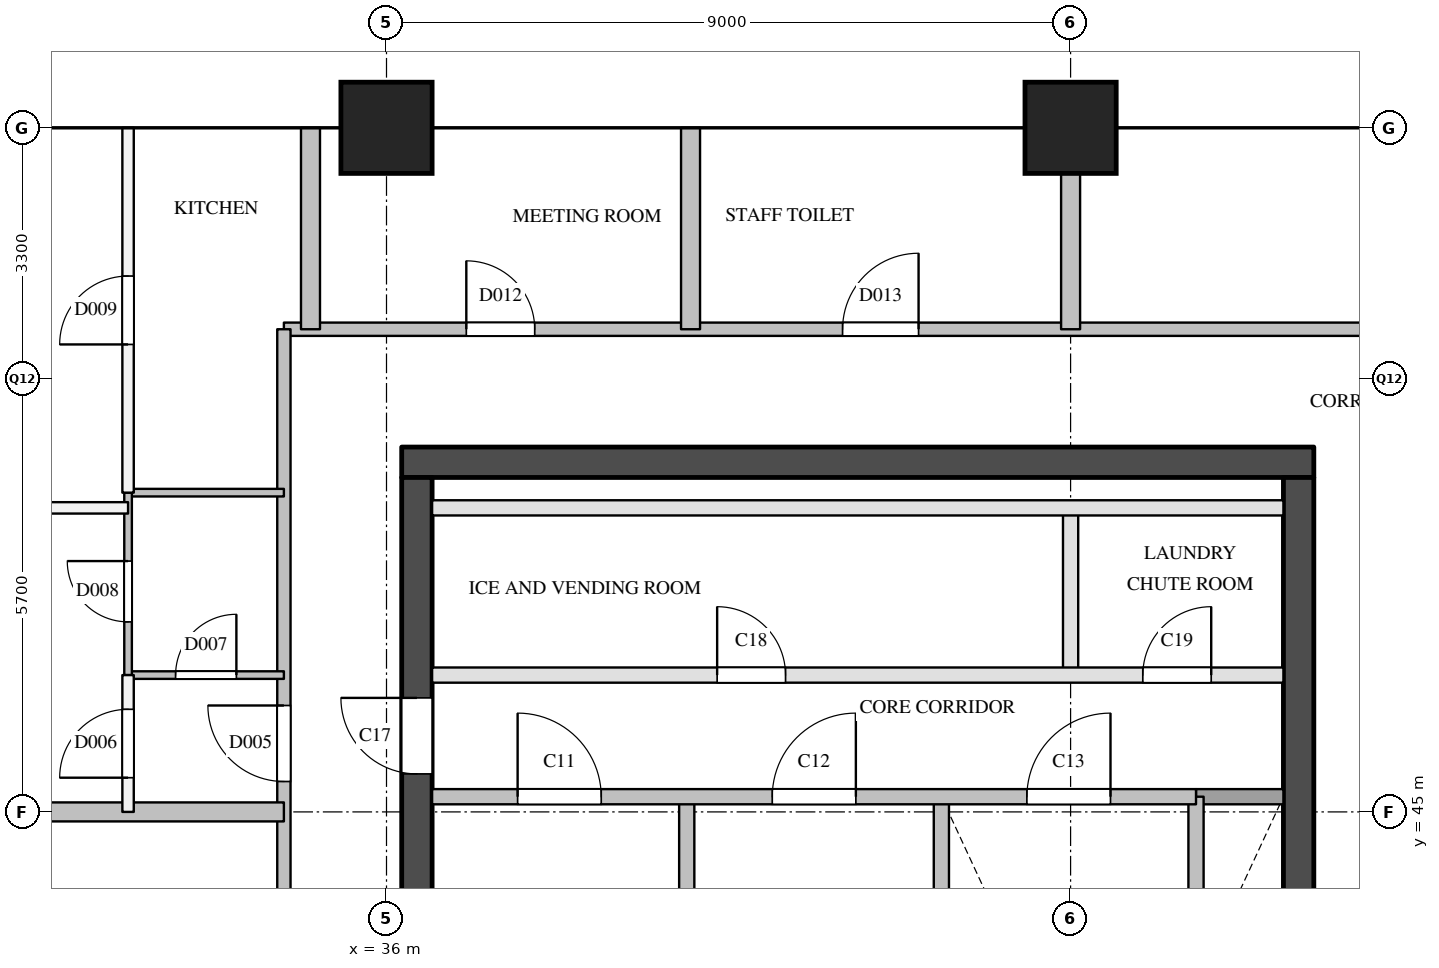
"""IFC4 building model, lengths in metres.
Left out: names, types, materials, properties, quantities, classifications, styles, units other than length and angle.
Written with IfcOpenShell. Run it as: python <this file> out.ifc"""

import sys

from ifc_helpers import new_model, si_unit, direction, frame, frame_2d, origin, origin_2d, place, context, subcontext, project, spatial, rectangle, extrude, element, fill, save


model = new_model("IFC4")
c1 = context("Model", 3, precision=1e-05, world=origin(), true_north=direction((0.0, 1.0)))
c2 = subcontext(c1, "Body", "Model", "MODEL_VIEW")
j1 = project(units=[si_unit("LENGTHUNIT", "METRE"), si_unit("PLANEANGLEUNIT", "RADIAN")], contexts=[c1])
p1 = place(None, origin())
s1 = spatial("IfcSite", under=j1, at=p1, CompositionType="ELEMENT")
p2 = place(p1, origin())
s2 = spatial("IfcBuilding", under=s1, at=p2, CompositionType="ELEMENT")
p3 = place(p2, frame((0.0, 0.0, 261.8)))
s3 = spatial("IfcBuildingStorey", under=s2, at=p3, CompositionType="ELEMENT", Elevation=261.8)
for number, where, z_axis, x_axis in (
    (1, (36.0, 54.0, 0.0), (0.0, 0.0, 1.0), (1.0, 0.0, 0.0)),
    (2, (45.0, 54.0, 0.0), (0.0, 0.0, 1.0), (1.0, 0.0, 0.0)),
):
    element("IfcColumn", number, at=place(p3, frame(where, z_axis=z_axis, x_axis=x_axis)), inside=s3, PredefinedType="COLUMN", context=c2, shape_type="SweptSolid", body=[
        extrude(rectangle(XDim=1.2, YDim=1.2, at=origin_2d()), origin(), (0.0, 0.0, 1.0), 3.9),
    ])
p4 = place(p3, frame((36.2, 49.6, 0.0), z_axis=(0.0, 0.0, 1.0), x_axis=(1.0, 0.0, 0.0)))
e3 = element("IfcWall", 3, at=p4, inside=s3, PredefinedType="SHEAR", context=c2, shape_type="SweptSolid", body=[
    extrude(rectangle(XDim=12.0, YDim=0.4, at=frame_2d((6.0, 0.0))), origin(), (0.0, 0.0, 1.0), 3.6),
])
p5 = place(p3, frame((36.4, 29.1, 0.0), z_axis=(0.0, 0.0, 1.0), x_axis=(0.0, 1.0, 0.0)))
e4 = element("IfcWall", 4, at=p5, inside=s3, PredefinedType="SHEAR", context=c2, shape_type="SweptSolid", body=[
    extrude(rectangle(XDim=20.3, YDim=0.4, at=frame_2d((10.15, 0.0))), origin(), (0.0, 0.0, 1.0), 3.6),
])
p6 = place(p5, frame((3.6, 0.0, 0.0)))
e5 = element("IfcOpeningElement", 5, at=p6, cuts=e4, PredefinedType="OPENING", context=c2, shape_type="SweptSolid", body=[
    extrude(rectangle(XDim=1.8, YDim=2.1, at=frame_2d((0.9, 1.05))), frame((0.0, 0.21, 0.0), z_axis=(0.0, -1.0, 0.0), x_axis=(1.0, 0.0, 0.0)), (0.0, 0.0, 1.0), 0.42),
])
p7 = place(p5, frame((16.4, 0.0, 0.0)))
e6 = element("IfcOpeningElement", 6, at=p7, cuts=e4, PredefinedType="OPENING", context=c2, shape_type="SweptSolid", body=[
    extrude(rectangle(XDim=1.0, YDim=2.1, at=frame_2d((0.5, 1.05))), frame((0.0, 0.21, 0.0), z_axis=(0.0, -1.0, 0.0), x_axis=(1.0, 0.0, 0.0)), (0.0, 0.0, 1.0), 0.42),
])
p8 = place(p3, frame((48.0, 29.1, 0.0), z_axis=(0.0, 0.0, 1.0), x_axis=(0.0, 1.0, 0.0)))
e7 = element("IfcWall", 7, at=p8, inside=s3, PredefinedType="SHEAR", context=c2, shape_type="SweptSolid", body=[
    extrude(rectangle(XDim=20.3, YDim=0.4, at=frame_2d((10.15, 0.0))), origin(), (0.0, 0.0, 1.0), 3.6),
])
p9 = place(p8, frame((12.5, 0.0, 0.0)))
e8 = element("IfcOpeningElement", 8, at=p9, cuts=e7, PredefinedType="OPENING", context=c2, shape_type="SweptSolid", body=[
    extrude(rectangle(XDim=0.7, YDim=2.1, at=frame_2d((0.35, 1.05))), frame((0.0, 0.21, 0.0), z_axis=(0.0, -1.0, 0.0), x_axis=(1.0, 0.0, 0.0)), (0.0, 0.0, 1.0), 0.42),
])
p10 = place(p8, frame((3.9, 0.0, 0.0)))
e9 = element("IfcOpeningElement", 9, at=p10, cuts=e7, PredefinedType="OPENING", context=c2, shape_type="SweptSolid", body=[
    extrude(rectangle(XDim=1.8, YDim=2.1, at=frame_2d((0.9, 1.05))), frame((0.0, 0.21, 0.0), z_axis=(0.0, -1.0, 0.0), x_axis=(1.0, 0.0, 0.0)), (0.0, 0.0, 1.0), 0.42),
])
for number, where, z_axis, x_axis in (
    (10, (39.95, 40.78, 0.0), (0.0, 0.0, 1.0), (0.0, 1.0, 0.0)),
    (11, (43.3, 40.78, 0.0), (0.0, 0.0, 1.0), (0.0, 1.0, 0.0)),
):
    element("IfcWall", number, at=place(p3, frame(where, z_axis=z_axis, x_axis=x_axis)), inside=s3, PredefinedType="SOLIDWALL", context=c2, shape_type="SweptSolid", body=[
        extrude(rectangle(XDim=4.42, YDim=0.2, at=frame_2d((2.21, 0.0))), origin(), (0.0, 0.0, 1.0), 3.6),
    ])
p11 = place(p3, frame((45.0, 46.8, 0.0), z_axis=(0.0, 0.0, 1.0), x_axis=(0.0, 1.0, 0.0)))
e12 = element("IfcWall", 12, at=p11, inside=s3, PredefinedType="PARTITIONING", context=c2, shape_type="SweptSolid", body=[
    extrude(rectangle(XDim=2.2, YDim=0.2, at=frame_2d((1.1, 0.0))), origin(), (0.0, 0.0, 1.0), 3.6),
])
p12 = place(p3, frame((46.65, 40.78, 0.0), z_axis=(0.0, 0.0, 1.0), x_axis=(0.0, 1.0, 0.0)))
e13 = element("IfcWall", 13, at=p12, inside=s3, PredefinedType="SOLIDWALL", context=c2, shape_type="SweptSolid", body=[
    extrude(rectangle(XDim=4.42, YDim=0.2, at=frame_2d((2.21, 0.0))), origin(), (0.0, 0.0, 1.0), 3.6),
])
p13 = place(p3, frame((46.65, 45.2, 0.0), z_axis=(0.0, 0.0, 1.0), x_axis=(1.0, 0.0, 0.0)))
e14 = element("IfcWall", 14, at=p13, inside=s3, PredefinedType="SOLIDWALL", context=c2, shape_type="SweptSolid", body=[
    extrude(rectangle(XDim=1.15, YDim=0.2, at=frame_2d((0.575, 0.0))), origin(), (0.0, 0.0, 1.0), 3.6),
])
p14 = place(p3, frame((36.6, 45.2, 0.0), z_axis=(0.0, 0.0, 1.0), x_axis=(1.0, 0.0, 0.0)))
e15 = element("IfcWall", 15, at=p14, inside=s3, PredefinedType="SOLIDWALL", context=c2, shape_type="SweptSolid", body=[
    extrude(rectangle(XDim=10.05, YDim=0.2, at=frame_2d((5.025, 0.0))), origin(), (0.0, 0.0, 1.0), 3.6),
])
p15 = place(p14, frame((1.125, 0.0, 0.0)))
e16 = element("IfcOpeningElement", 16, at=p15, cuts=e15, PredefinedType="OPENING", context=c2, shape_type="SweptSolid", body=[
    extrude(rectangle(XDim=1.1, YDim=2.1, at=frame_2d((0.55, 1.05))), frame((0.0, 0.11, 0.0), z_axis=(0.0, -1.0, 0.0), x_axis=(1.0, 0.0, 0.0)), (0.0, 0.0, 1.0), 0.22),
])
p16 = place(p14, frame((4.475, 0.0, 0.0)))
e17 = element("IfcOpeningElement", 17, at=p16, cuts=e15, PredefinedType="OPENING", context=c2, shape_type="SweptSolid", body=[
    extrude(rectangle(XDim=1.1, YDim=2.1, at=frame_2d((0.55, 1.05))), frame((0.0, 0.11, 0.0), z_axis=(0.0, -1.0, 0.0), x_axis=(1.0, 0.0, 0.0)), (0.0, 0.0, 1.0), 0.22),
])
p17 = place(p14, frame((7.825, 0.0, 0.0)))
e18 = element("IfcOpeningElement", 18, at=p17, cuts=e15, PredefinedType="OPENING", context=c2, shape_type="SweptSolid", body=[
    extrude(rectangle(XDim=1.1, YDim=2.1, at=frame_2d((0.55, 1.05))), frame((0.0, 0.11, 0.0), z_axis=(0.0, -1.0, 0.0), x_axis=(1.0, 0.0, 0.0)), (0.0, 0.0, 1.0), 0.22),
])
p18 = place(p3, frame((36.6, 46.8, 0.0), z_axis=(0.0, 0.0, 1.0), x_axis=(1.0, 0.0, 0.0)))
e19 = element("IfcWall", 19, at=p18, inside=s3, PredefinedType="PARTITIONING", context=c2, shape_type="SweptSolid", body=[
    extrude(rectangle(XDim=11.2, YDim=0.2, at=frame_2d((5.6, 0.0))), origin(), (0.0, 0.0, 1.0), 3.6),
])
p19 = place(p18, frame((3.75, 0.0, 0.0)))
e20 = element("IfcOpeningElement", 20, at=p19, cuts=e19, PredefinedType="OPENING", context=c2, shape_type="SweptSolid", body=[
    extrude(rectangle(XDim=0.9, YDim=2.1, at=frame_2d((0.45, 1.05))), frame((0.0, 0.11, 0.0), z_axis=(0.0, -1.0, 0.0), x_axis=(1.0, 0.0, 0.0)), (0.0, 0.0, 1.0), 0.22),
])
p20 = place(p18, frame((9.35, 0.0, 0.0)))
e21 = element("IfcOpeningElement", 21, at=p20, cuts=e19, PredefinedType="OPENING", context=c2, shape_type="SweptSolid", body=[
    extrude(rectangle(XDim=0.9, YDim=2.1, at=frame_2d((0.45, 1.05))), frame((0.0, 0.11, 0.0), z_axis=(0.0, -1.0, 0.0), x_axis=(1.0, 0.0, 0.0)), (0.0, 0.0, 1.0), 0.22),
])
p21 = place(p3, frame((36.6, 49.0, 0.0), z_axis=(0.0, 0.0, 1.0), x_axis=(1.0, 0.0, 0.0)))
e22 = element("IfcWall", 22, at=p21, inside=s3, PredefinedType="PARTITIONING", context=c2, shape_type="SweptSolid", body=[
    extrude(rectangle(XDim=11.2, YDim=0.2, at=frame_2d((5.6, 0.0))), origin(), (0.0, 0.0, 1.0), 3.6),
])
p22 = place(p3, frame((34.65, 51.35, 0.0), z_axis=(0.0, 0.0, 1.0), x_axis=(1.0, 0.0, 0.0)))
e23 = element("IfcWall", 23, at=p22, inside=s3, PredefinedType="PARTITIONING", context=c2, shape_type="SweptSolid", body=[
    extrude(rectangle(XDim=15.1, YDim=0.175, at=frame_2d((7.55, 0.0))), origin(), (0.0, 0.0, 1.0), 3.6),
])
p23 = place(p22, frame((2.4, 0.0, 0.0)))
e24 = element("IfcOpeningElement", 24, at=p23, cuts=e23, PredefinedType="OPENING", context=c2, shape_type="SweptSolid", body=[
    extrude(rectangle(XDim=0.9, YDim=2.1, at=frame_2d((0.45, 1.05))), frame((0.0, 0.097, 0.0), z_axis=(0.0, -1.0, 0.0), x_axis=(1.0, 0.0, 0.0)), (0.0, 0.0, 1.0), 0.195),
])
p24 = place(p22, frame((7.35, 0.0, 0.0)))
e25 = element("IfcOpeningElement", 25, at=p24, cuts=e23, PredefinedType="OPENING", context=c2, shape_type="SweptSolid", body=[
    extrude(rectangle(XDim=1.0, YDim=2.1, at=frame_2d((0.5, 1.05))), frame((0.0, 0.097, 0.0), z_axis=(0.0, -1.0, 0.0), x_axis=(1.0, 0.0, 0.0)), (0.0, 0.0, 1.0), 0.195),
])
p25 = place(p3, frame((34.65, 28.5, 0.0), z_axis=(0.0, 0.0, 1.0), x_axis=(0.0, 1.0, 0.0)))
e26 = element("IfcWall", 26, at=p25, inside=s3, PredefinedType="PARTITIONING", context=c2, shape_type="SweptSolid", body=[
    extrude(rectangle(XDim=22.85, YDim=0.175, at=frame_2d((11.425, 0.0))), origin(), (0.0, 0.0, 1.0), 3.6),
])
p26 = place(p25, frame((5.3, 0.0, 0.0)))
e27 = element("IfcOpeningElement", 27, at=p26, cuts=e26, PredefinedType="OPENING", context=c2, shape_type="SweptSolid", body=[
    extrude(rectangle(XDim=0.9, YDim=2.1, at=frame_2d((0.45, 1.05))), frame((0.0, 0.097, 0.0), z_axis=(0.0, -1.0, 0.0), x_axis=(1.0, 0.0, 0.0)), (0.0, 0.0, 1.0), 0.195),
])
p27 = place(p25, frame((13.5, 0.0, 0.0)))
e28 = element("IfcOpeningElement", 28, at=p27, cuts=e26, PredefinedType="OPENING", context=c2, shape_type="SweptSolid", body=[
    extrude(rectangle(XDim=1.0, YDim=2.1, at=frame_2d((0.5, 1.05))), frame((0.0, 0.097, 0.0), z_axis=(0.0, -1.0, 0.0), x_axis=(1.0, 0.0, 0.0)), (0.0, 0.0, 1.0), 0.195),
])
p28 = place(p25, frame((16.9, 0.0, 0.0)))
e29 = element("IfcOpeningElement", 29, at=p28, cuts=e26, PredefinedType="OPENING", context=c2, shape_type="SweptSolid", body=[
    extrude(rectangle(XDim=1.0, YDim=2.1, at=frame_2d((0.5, 1.05))), frame((0.0, 0.097, 0.0), z_axis=(0.0, -1.0, 0.0), x_axis=(1.0, 0.0, 0.0)), (0.0, 0.0, 1.0), 0.195),
])
p29 = place(p3, frame((25.0, 49.0, 0.0), z_axis=(0.0, 0.0, 1.0), x_axis=(1.0, 0.0, 0.0)))
e30 = element("IfcWall", 30, at=p29, inside=s3, PredefinedType="PARTITIONING", context=c2, shape_type="SweptSolid", body=[
    extrude(rectangle(XDim=7.6, YDim=0.15, at=frame_2d((3.8, 0.0))), origin(), (0.0, 0.0, 1.0), 2.6),
])
p30 = place(p29, frame((5.136, 0.0, 0.0)))
e31 = element("IfcOpeningElement", 31, at=p30, cuts=e30, PredefinedType="OPENING", context=c2, shape_type="SweptSolid", body=[
    extrude(rectangle(XDim=0.9, YDim=2.1, at=frame_2d((0.45, 1.05))), frame((0.0, 0.085, 0.0), z_axis=(0.0, -1.0, 0.0), x_axis=(1.0, 0.0, 0.0)), (0.0, 0.0, 1.0), 0.17),
])
p31 = place(p29, frame((1.336, 0.0, 0.0)))
e32 = element("IfcOpeningElement", 32, at=p31, cuts=e30, PredefinedType="OPENING", context=c2, shape_type="SweptSolid", body=[
    extrude(rectangle(XDim=0.9, YDim=2.1, at=frame_2d((0.45, 1.05))), frame((0.0, 0.085, 0.0), z_axis=(0.0, -1.0, 0.0), x_axis=(1.0, 0.0, 0.0)), (0.0, 0.0, 1.0), 0.17),
])
p32 = place(p3, frame((32.6, 45.0, 0.0), z_axis=(0.0, 0.0, 1.0), x_axis=(0.0, 1.0, 0.0)))
e33 = element("IfcWall", 33, at=p32, inside=s3, PredefinedType="PARTITIONING", context=c2, shape_type="SweptSolid", body=[
    extrude(rectangle(XDim=1.8, YDim=0.15, at=frame_2d((0.9, 0.0))), origin(), (0.0, 0.0, 1.0), 3.6),
])
p33 = place(p32, frame((0.45, 0.0, 0.0)))
e34 = element("IfcOpeningElement", 34, at=p33, cuts=e33, PredefinedType="OPENING", context=c2, shape_type="SweptSolid", body=[
    extrude(rectangle(XDim=0.9, YDim=2.1, at=frame_2d((0.45, 1.05))), frame((0.0, 0.085, 0.0), z_axis=(0.0, -1.0, 0.0), x_axis=(1.0, 0.0, 0.0)), (0.0, 0.0, 1.0), 0.17),
])
p34 = place(p3, frame((32.6, 49.2, 0.0), z_axis=(0.0, 0.0, 1.0), x_axis=(0.0, 1.0, 0.0)))
e35 = element("IfcWall", 35, at=p34, inside=s3, PredefinedType="PARTITIONING", context=c2, shape_type="SweptSolid", body=[
    extrude(rectangle(XDim=4.8, YDim=0.15, at=frame_2d((2.4, 0.0))), origin(), (0.0, 0.0, 1.0), 2.6),
])
p35 = place(p34, frame((1.95, 0.0, 0.0)))
e36 = element("IfcOpeningElement", 36, at=p35, cuts=e35, PredefinedType="OPENING", context=c2, shape_type="SweptSolid", body=[
    extrude(rectangle(XDim=0.9, YDim=2.1, at=frame_2d((0.45, 1.05))), frame((0.0, 0.085, 0.0), z_axis=(0.0, -1.0, 0.0), x_axis=(1.0, 0.0, 0.0)), (0.0, 0.0, 1.0), 0.17),
])
p36 = place(p3, frame((25.0, 45.0, 0.0), z_axis=(0.0, 0.0, 1.0), x_axis=(1.0, 0.0, 0.0)))
e37 = element("IfcWall", 37, at=p36, inside=s3, PredefinedType="PARTITIONING", context=c2, shape_type="SweptSolid", body=[
    extrude(rectangle(XDim=9.65, YDim=0.25, at=frame_2d((4.825, 0.0))), origin(), (0.0, 0.0, 1.0), 3.6),
])
for number, where, z_axis, x_axis in (
    (38, (35.0, 51.35, 0.0), (0.0, 0.0, 1.0), (0.0, 1.0, 0.0)),
    (39, (40.0, 51.35, 0.0), (0.0, 0.0, 1.0), (0.0, 1.0, 0.0)),
):
    element("IfcWall", number, at=place(p3, frame(where, z_axis=z_axis, x_axis=x_axis)), inside=s3, PredefinedType="PARTITIONING", context=c2, shape_type="SweptSolid", body=[
        extrude(rectangle(XDim=2.65, YDim=0.25, at=frame_2d((1.325, 0.0))), origin(), (0.0, 0.0, 1.0), 2.6),
    ])
p37 = place(p3, frame((45.0, 51.35, 0.0), z_axis=(0.0, 0.0, 1.0), x_axis=(0.0, 1.0, 0.0)))
e40 = element("IfcWall", 40, at=p37, inside=s3, PredefinedType="PARTITIONING", context=c2, shape_type="SweptSolid", body=[
    extrude(rectangle(XDim=2.65, YDim=0.25, at=frame_2d((1.325, 0.0))), origin(), (0.0, 0.0, 1.0), 3.6),
])
p38 = place(p3, frame((32.6, 46.8, 0.0), z_axis=(0.0, 0.0, 1.0), x_axis=(1.0, 0.0, 0.0)))
e41 = element("IfcWall", 41, at=p38, inside=s3, PredefinedType="PARTITIONING", context=c2, shape_type="SweptSolid", body=[
    extrude(rectangle(XDim=2.05, YDim=0.1, at=frame_2d((1.025, 0.0))), origin(), (0.0, 0.0, 1.0), 3.6),
])
p39 = place(p38, frame((0.625, 0.0, 0.0)))
e42 = element("IfcOpeningElement", 42, at=p39, cuts=e41, PredefinedType="OPENING", context=c2, shape_type="SweptSolid", body=[
    extrude(rectangle(XDim=0.8, YDim=2.1, at=frame_2d((0.4, 1.05))), frame((0.0, 0.06, 0.0), z_axis=(0.0, -1.0, 0.0), x_axis=(1.0, 0.0, 0.0)), (0.0, 0.0, 1.0), 0.12),
])
p40 = place(p3, frame((32.6, 49.2, 0.0), z_axis=(0.0, 0.0, 1.0), x_axis=(1.0, 0.0, 0.0)))
e43 = element("IfcWall", 43, at=p40, inside=s3, PredefinedType="PARTITIONING", context=c2, shape_type="SweptSolid", body=[
    extrude(rectangle(XDim=2.05, YDim=0.1, at=frame_2d((1.025, 0.0))), origin(), (0.0, 0.0, 1.0), 3.6),
])
p41 = place(p3, frame((32.6, 46.8, 0.0), z_axis=(0.0, 0.0, 1.0), x_axis=(0.0, 1.0, 0.0)))
e44 = element("IfcWall", 44, at=p41, inside=s3, PredefinedType="PARTITIONING", context=c2, shape_type="SweptSolid", body=[
    extrude(rectangle(XDim=2.4, YDim=0.1, at=frame_2d((1.2, 0.0))), origin(), (0.0, 0.0, 1.0), 3.6),
])
p42 = place(p41, frame((0.7, 0.0, 0.0)))
e45 = element("IfcOpeningElement", 45, at=p42, cuts=e44, PredefinedType="OPENING", context=c2, shape_type="SweptSolid", body=[
    extrude(rectangle(XDim=0.8, YDim=2.1, at=frame_2d((0.4, 1.05))), frame((0.0, 0.06, 0.0), z_axis=(0.0, -1.0, 0.0), x_axis=(1.0, 0.0, 0.0)), (0.0, 0.0, 1.0), 0.12),
])
p43 = place(p15, origin())
e46 = element("IfcDoor", 46, at=p43, inside=s3, OperationType="SINGLE_SWING_LEFT", PredefinedType="DOOR", context=c2, shape_type="SweptSolid", body=[
    extrude(rectangle(XDim=1.1, YDim=2.1, at=frame_2d((0.55, 1.05))), frame((0.0, 0.025, 0.0), z_axis=(0.0, -1.0, 0.0), x_axis=(1.0, 0.0, 0.0)), (0.0, 0.0, 1.0), 0.05),
])
fill(e16, e46)
p44 = place(p16, origin())
e47 = element("IfcDoor", 47, at=p44, inside=s3, OperationType="SINGLE_SWING_RIGHT", PredefinedType="DOOR", context=c2, shape_type="SweptSolid", body=[
    extrude(rectangle(XDim=1.1, YDim=2.1, at=frame_2d((0.55, 1.05))), frame((0.0, 0.025, 0.0), z_axis=(0.0, -1.0, 0.0), x_axis=(1.0, 0.0, 0.0)), (0.0, 0.0, 1.0), 0.05),
])
fill(e17, e47)
p45 = place(p17, origin())
e48 = element("IfcDoor", 48, at=p45, inside=s3, OperationType="SINGLE_SWING_RIGHT", PredefinedType="DOOR", context=c2, shape_type="SweptSolid", body=[
    extrude(rectangle(XDim=1.1, YDim=2.1, at=frame_2d((0.55, 1.05))), frame((0.0, 0.025, 0.0), z_axis=(0.0, -1.0, 0.0), x_axis=(1.0, 0.0, 0.0)), (0.0, 0.0, 1.0), 0.05),
])
fill(e18, e48)
p46 = place(p7, origin())
e49 = element("IfcDoor", 49, at=p46, inside=s3, OperationType="SINGLE_SWING_RIGHT", PredefinedType="DOOR", context=c2, shape_type="SweptSolid", body=[
    extrude(rectangle(XDim=1.0, YDim=2.1, at=frame_2d((0.5, 1.05))), frame((0.0, 0.025, 0.0), z_axis=(0.0, -1.0, 0.0), x_axis=(1.0, 0.0, 0.0)), (0.0, 0.0, 1.0), 0.05),
])
fill(e6, e49)
p47 = place(p19, origin())
e50 = element("IfcDoor", 50, at=p47, inside=s3, OperationType="SINGLE_SWING_LEFT", PredefinedType="DOOR", context=c2, shape_type="SweptSolid", body=[
    extrude(rectangle(XDim=0.9, YDim=2.1, at=frame_2d((0.45, 1.05))), frame((0.0, 0.025, 0.0), z_axis=(0.0, -1.0, 0.0), x_axis=(1.0, 0.0, 0.0)), (0.0, 0.0, 1.0), 0.05),
])
fill(e20, e50)
p48 = place(p20, origin())
e51 = element("IfcDoor", 51, at=p48, inside=s3, OperationType="SINGLE_SWING_RIGHT", PredefinedType="DOOR", context=c2, shape_type="SweptSolid", body=[
    extrude(rectangle(XDim=0.9, YDim=2.1, at=frame_2d((0.45, 1.05))), frame((0.0, 0.025, 0.0), z_axis=(0.0, -1.0, 0.0), x_axis=(1.0, 0.0, 0.0)), (0.0, 0.0, 1.0), 0.05),
])
fill(e21, e51)
p49 = place(p28, origin())
e52 = element("IfcDoor", 52, at=p49, inside=s3, OperationType="SINGLE_SWING_RIGHT", PredefinedType="DOOR", context=c2, shape_type="SweptSolid", body=[
    extrude(rectangle(XDim=1.0, YDim=2.1, at=frame_2d((0.5, 1.05))), frame((0.0, 0.025, 0.0), z_axis=(0.0, -1.0, 0.0), x_axis=(1.0, 0.0, 0.0)), (0.0, 0.0, 1.0), 0.05),
])
fill(e29, e52)
p50 = place(p33, origin())
e53 = element("IfcDoor", 53, at=p50, inside=s3, OperationType="SINGLE_SWING_LEFT", PredefinedType="DOOR", context=c2, shape_type="SweptSolid", body=[
    extrude(rectangle(XDim=0.9, YDim=2.1, at=frame_2d((0.45, 1.05))), frame((0.0, 0.025, 0.0), z_axis=(0.0, -1.0, 0.0), x_axis=(1.0, 0.0, 0.0)), (0.0, 0.0, 1.0), 0.05),
])
fill(e34, e53)
p51 = place(p39, origin())
e54 = element("IfcDoor", 54, at=p51, inside=s3, OperationType="SINGLE_SWING_RIGHT", PredefinedType="DOOR", context=c2, shape_type="SweptSolid", body=[
    extrude(rectangle(XDim=0.8, YDim=2.1, at=frame_2d((0.4, 1.05))), frame((0.0, 0.025, 0.0), z_axis=(0.0, -1.0, 0.0), x_axis=(1.0, 0.0, 0.0)), (0.0, 0.0, 1.0), 0.05),
])
fill(e42, e54)
p52 = place(p42, origin())
e55 = element("IfcDoor", 55, at=p52, inside=s3, OperationType="SINGLE_SWING_RIGHT", PredefinedType="DOOR", context=c2, shape_type="SweptSolid", body=[
    extrude(rectangle(XDim=0.8, YDim=2.1, at=frame_2d((0.4, 1.05))), frame((0.0, 0.025, 0.0), z_axis=(0.0, -1.0, 0.0), x_axis=(1.0, 0.0, 0.0)), (0.0, 0.0, 1.0), 0.05),
])
fill(e45, e55)
p53 = place(p35, origin())
e56 = element("IfcDoor", 56, at=p53, inside=s3, OperationType="SINGLE_SWING_LEFT", PredefinedType="DOOR", context=c2, shape_type="SweptSolid", body=[
    extrude(rectangle(XDim=0.9, YDim=2.1, at=frame_2d((0.45, 1.05))), frame((0.0, 0.025, 0.0), z_axis=(0.0, -1.0, 0.0), x_axis=(1.0, 0.0, 0.0)), (0.0, 0.0, 1.0), 0.05),
])
fill(e36, e56)
p54 = place(p23, origin())
e57 = element("IfcDoor", 57, at=p54, inside=s3, OperationType="SINGLE_SWING_LEFT", PredefinedType="DOOR", context=c2, shape_type="SweptSolid", body=[
    extrude(rectangle(XDim=0.9, YDim=2.1, at=frame_2d((0.45, 1.05))), frame((0.0, 0.025, 0.0), z_axis=(0.0, -1.0, 0.0), x_axis=(1.0, 0.0, 0.0)), (0.0, 0.0, 1.0), 0.05),
])
fill(e24, e57)
p55 = place(p24, origin())
e58 = element("IfcDoor", 58, at=p55, inside=s3, OperationType="SINGLE_SWING_RIGHT", PredefinedType="DOOR", context=c2, shape_type="SweptSolid", body=[
    extrude(rectangle(XDim=1.0, YDim=2.1, at=frame_2d((0.5, 1.05))), frame((0.0, 0.025, 0.0), z_axis=(0.0, -1.0, 0.0), x_axis=(1.0, 0.0, 0.0)), (0.0, 0.0, 1.0), 0.05),
])
fill(e25, e58)
save(model, sys.argv[1])
